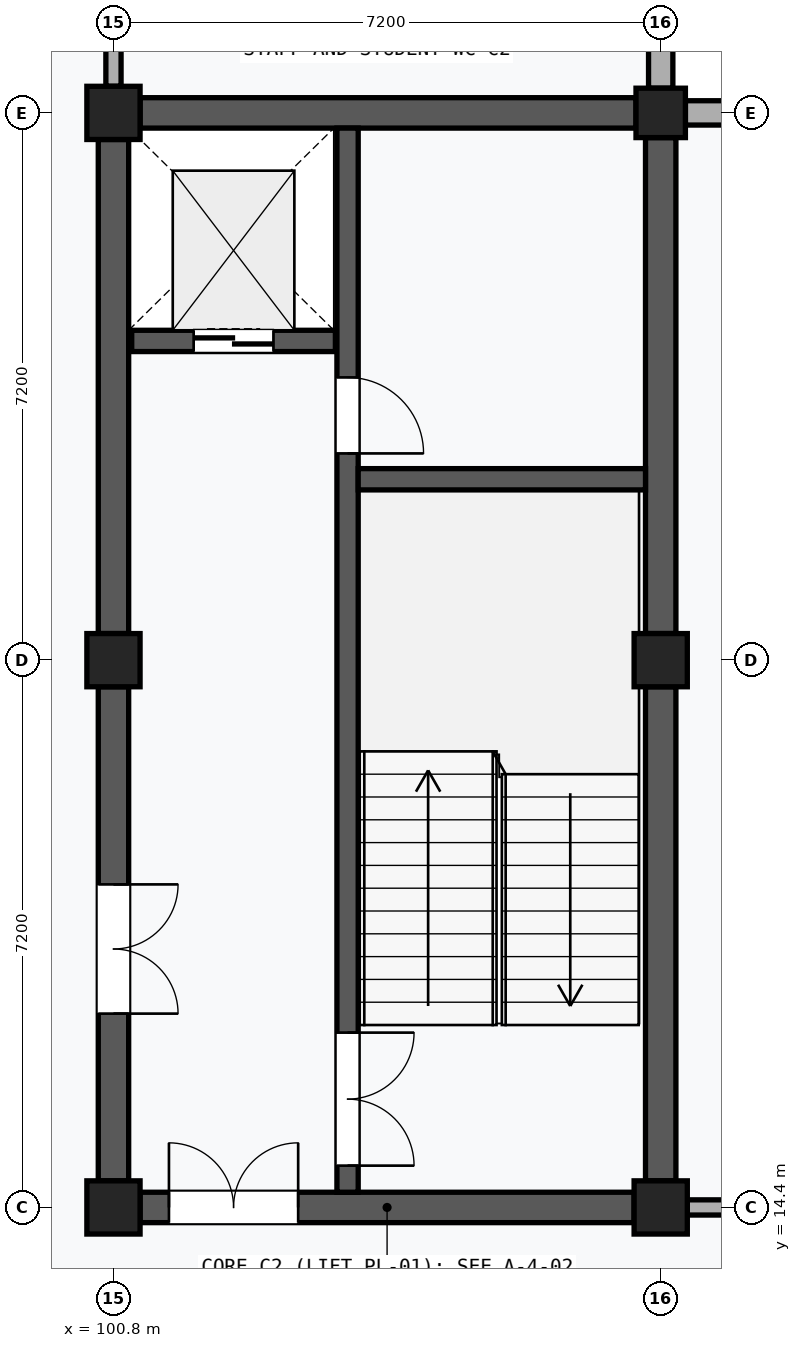
"""IFC4 building model, lengths in metres.
Left out: names, types, materials, properties, quantities, classifications, styles, units other than length and angle.
Written with IfcOpenShell. Run it as: python <this file> out.ifc"""

import sys

from ifc_helpers import new_model, si_unit, direction, frame, frame_2d, origin, origin_2d, place, context, subcontext, project, spatial, rectangle, extrude, element, fill, save


model = new_model("IFC4")
c1 = context("Model", 3, precision=1e-05, world=origin(), true_north=direction((0.0, 1.0)))
c2 = subcontext(c1, "Body", "Model", "MODEL_VIEW")
j1 = project(units=[si_unit("LENGTHUNIT", "METRE"), si_unit("PLANEANGLEUNIT", "RADIAN")], contexts=[c1])
p1 = place(None, origin())
s1 = spatial("IfcSite", under=j1, at=p1, CompositionType="ELEMENT")
p2 = place(p1, origin())
s2 = spatial("IfcBuilding", under=s1, at=p2, CompositionType="ELEMENT")
p3 = place(p2, frame((0.0, 0.0, 26.6)))
s3 = spatial("IfcBuildingStorey", under=s2, at=p3, CompositionType="ELEMENT", Elevation=26.6)
for number, where, z_axis, x_axis in (
    (1, (100.8, 14.4, 0.0), (0.0, 0.0, 1.0), (1.0, 0.0, 0.0)),
    (2, (100.8, 21.6, 0.0), (0.0, 0.0, 1.0), (1.0, 0.0, 0.0)),
    (3, (100.8, 28.8, 0.0), (0.0, 0.0, 1.0), (1.0, 0.0, 0.0)),
    (4, (108.0, 14.4, 0.0), (0.0, 0.0, 1.0), (1.0, 0.0, 0.0)),
    (5, (108.0, 21.6, 0.0), (0.0, 0.0, 1.0), (1.0, 0.0, 0.0)),
):
    element("IfcColumn", number, at=place(p3, frame(where, z_axis=z_axis, x_axis=x_axis)), inside=s3, PredefinedType="COLUMN", context=c2, shape_type="SweptSolid", body=[
        extrude(rectangle(XDim=0.7, YDim=0.7, at=origin_2d()), origin(), (0.0, 0.0, 1.0), 4.0),
    ])
p4 = place(p3, frame((108.0, 28.8, 0.0), z_axis=(0.0, 0.0, 1.0), x_axis=(1.0, 0.0, 0.0)))
e6 = element("IfcColumn", 6, at=p4, inside=s3, PredefinedType="COLUMN", context=c2, shape_type="SweptSolid", body=[
    extrude(rectangle(XDim=0.65, YDim=0.65, at=origin_2d()), origin(), (0.0, 0.0, 1.0), 4.0),
])
p5 = place(p3, frame((108.0, 29.125, 0.0), z_axis=(0.0, 0.0, 1.0), x_axis=(0.0, 1.0, 0.0)))
e7 = element("IfcWall", 7, at=p5, inside=s3, PredefinedType="SOLIDWALL", context=c2, shape_type="SweptSolid", body=[
    extrude(rectangle(XDim=6.5, YDim=0.32, at=frame_2d((3.25, 0.0))), origin(), (0.0, 0.0, 1.0), 3.1),
])
p6 = place(p5, frame((2.5, 0.0, 1.1)))
e8 = element("IfcOpeningElement", 8, at=p6, cuts=e7, PredefinedType="OPENING", context=c2, shape_type="SweptSolid", body=[
    extrude(rectangle(XDim=1.5, YDim=1.35, at=frame_2d((0.75, 0.675))), frame((0.0, 0.172, 0.0), z_axis=(0.0, -1.0, 0.0), x_axis=(1.0, 0.0, 0.0)), (0.0, 0.0, 1.0), 0.344),
])
p7 = place(p3, frame((108.325, 28.8, 0.0), z_axis=(0.0, 0.0, 1.0), x_axis=(1.0, 0.0, 0.0)))
e9 = element("IfcWall", 9, at=p7, inside=s3, PredefinedType="SOLIDWALL", context=c2, shape_type="SweptSolid", body=[
    extrude(rectangle(XDim=6.625, YDim=0.32, at=frame_2d((3.312, 0.0))), origin(), (0.0, 0.0, 1.0), 3.1),
])
p8 = place(p7, frame((2.562, 0.0, 1.1)))
e10 = element("IfcOpeningElement", 10, at=p8, cuts=e9, PredefinedType="OPENING", context=c2, shape_type="SweptSolid", body=[
    extrude(rectangle(XDim=1.5, YDim=1.35, at=frame_2d((0.75, 0.675))), frame((0.0, 0.172, 0.0), z_axis=(0.0, -1.0, 0.0), x_axis=(1.0, 0.0, 0.0)), (0.0, 0.0, 1.0), 0.344),
])
p9 = place(p3, frame((100.8, 14.75, 0.0), z_axis=(0.0, 0.0, 1.0), x_axis=(0.0, 1.0, 0.0)))
e11 = element("IfcWall", 11, at=p9, inside=s3, PredefinedType="SHEAR", context=c2, shape_type="SweptSolid", body=[
    extrude(rectangle(XDim=6.5, YDim=0.4, at=frame_2d((3.25, 0.0))), origin(), (0.0, 0.0, 1.0), 2.96),
])
p10 = place(p9, frame((2.2, 0.0, 0.0)))
e12 = element("IfcOpeningElement", 12, at=p10, cuts=e11, PredefinedType="OPENING", context=c2, shape_type="SweptSolid", body=[
    extrude(rectangle(XDim=1.7, YDim=2.25, at=frame_2d((0.85, 1.125))), frame((0.0, 0.212, 0.0), z_axis=(0.0, -1.0, 0.0), x_axis=(1.0, 0.0, 0.0)), (0.0, 0.0, 1.0), 0.424),
])
for number, where, z_axis, x_axis in (
    (13, (100.8, 21.95, 0.0), (0.0, 0.0, 1.0), (0.0, 1.0, 0.0)),
    (14, (108.0, 14.75, 0.0), (0.0, 0.0, 1.0), (0.0, 1.0, 0.0)),
):
    element("IfcWall", number, at=place(p3, frame(where, z_axis=z_axis, x_axis=x_axis)), inside=s3, PredefinedType="SHEAR", context=c2, shape_type="SweptSolid", body=[
        extrude(rectangle(XDim=6.5, YDim=0.4, at=frame_2d((3.25, 0.0))), origin(), (0.0, 0.0, 1.0), 2.96),
    ])
p11 = place(p3, frame((108.0, 21.95, 0.0), z_axis=(0.0, 0.0, 1.0), x_axis=(0.0, 1.0, 0.0)))
e15 = element("IfcWall", 15, at=p11, inside=s3, PredefinedType="SHEAR", context=c2, shape_type="SweptSolid", body=[
    extrude(rectangle(XDim=6.525, YDim=0.4, at=frame_2d((3.263, 0.0))), origin(), (0.0, 0.0, 1.0), 2.96),
])
p12 = place(p3, frame((101.15, 14.4, 0.0), z_axis=(0.0, 0.0, 1.0), x_axis=(1.0, 0.0, 0.0)))
e16 = element("IfcWall", 16, at=p12, inside=s3, PredefinedType="SHEAR", context=c2, shape_type="SweptSolid", body=[
    extrude(rectangle(XDim=6.5, YDim=0.4, at=frame_2d((3.25, 0.0))), origin(), (0.0, 0.0, 1.0), 3.03),
])
p13 = place(p12, frame((0.38, 0.0, 0.0)))
e17 = element("IfcOpeningElement", 17, at=p13, cuts=e16, PredefinedType="OPENING", context=c2, shape_type="SweptSolid", body=[
    extrude(rectangle(XDim=1.7, YDim=2.25, at=frame_2d((0.85, 1.125))), frame((0.0, 0.212, 0.0), z_axis=(0.0, -1.0, 0.0), x_axis=(1.0, 0.0, 0.0)), (0.0, 0.0, 1.0), 0.424),
])
p14 = place(p3, frame((101.15, 28.8, 0.0), z_axis=(0.0, 0.0, 1.0), x_axis=(1.0, 0.0, 0.0)))
e18 = element("IfcWall", 18, at=p14, inside=s3, PredefinedType="SHEAR", context=c2, shape_type="SweptSolid", body=[
    extrude(rectangle(XDim=6.525, YDim=0.4, at=frame_2d((3.263, 0.0))), origin(), (0.0, 0.0, 1.0), 2.96),
])
p15 = place(p3, frame((103.88, 14.6, 0.0), z_axis=(0.0, 0.0, 1.0), x_axis=(0.0, 1.0, 0.0)))
e19 = element("IfcWall", 19, at=p15, inside=s3, PredefinedType="SHEAR", context=c2, shape_type="SweptSolid", body=[
    extrude(rectangle(XDim=14.0, YDim=0.28, at=frame_2d((7.0, 0.0))), origin(), (0.0, 0.0, 1.0), 3.73),
])
p16 = place(p15, frame((0.35, 0.0, 0.0)))
e20 = element("IfcOpeningElement", 20, at=p16, cuts=e19, PredefinedType="OPENING", context=c2, shape_type="SweptSolid", body=[
    extrude(rectangle(XDim=1.75, YDim=2.15, at=frame_2d((0.875, 1.075))), frame((0.0, 0.152, 0.0), z_axis=(0.0, -1.0, 0.0), x_axis=(1.0, 0.0, 0.0)), (0.0, 0.0, 1.0), 0.304),
])
p17 = place(p15, frame((9.72, 0.0, 0.0)))
e21 = element("IfcOpeningElement", 21, at=p17, cuts=e19, PredefinedType="OPENING", context=c2, shape_type="SweptSolid", body=[
    extrude(rectangle(XDim=1.0, YDim=2.15, at=frame_2d((0.5, 1.075))), frame((0.0, 0.152, 0.0), z_axis=(0.0, -1.0, 0.0), x_axis=(1.0, 0.0, 0.0)), (0.0, 0.0, 1.0), 0.304),
])
p18 = place(p3, frame((104.02, 23.98, 0.0), z_axis=(0.0, 0.0, 1.0), x_axis=(1.0, 0.0, 0.0)))
e22 = element("IfcWall", 22, at=p18, inside=s3, PredefinedType="SHEAR", context=c2, shape_type="SweptSolid", body=[
    extrude(rectangle(XDim=3.78, YDim=0.28, at=frame_2d((1.89, 0.0))), origin(), (0.0, 0.0, 1.0), 3.73),
])
p19 = place(p3, frame((101.04, 25.8, 0.0), z_axis=(0.0, 0.0, 1.0), x_axis=(1.0, 0.0, 0.0)))
e23 = element("IfcWall", 23, at=p19, inside=s3, PredefinedType="SHEAR", context=c2, shape_type="SweptSolid", body=[
    extrude(rectangle(XDim=2.68, YDim=0.28, at=frame_2d((1.34, 0.0))), origin(), (0.0, 0.0, 1.0), 3.73),
])
p20 = place(p19, frame((0.815, 0.0, 0.0)))
e24 = element("IfcOpeningElement", 24, at=p20, cuts=e23, PredefinedType="OPENING", context=c2, shape_type="SweptSolid", body=[
    extrude(rectangle(XDim=1.05, YDim=2.2, at=frame_2d((0.525, 1.1))), frame((0.0, 0.152, 0.0), z_axis=(0.0, -1.0, 0.0), x_axis=(1.0, 0.0, 0.0)), (0.0, 0.0, 1.0), 0.304),
])
p21 = place(p3, frame((108.35, 14.4, 0.0), z_axis=(0.0, 0.0, 1.0), x_axis=(1.0, 0.0, 0.0)))
e25 = element("IfcWall", 25, at=p21, inside=s3, PredefinedType="PARTITIONING", context=c2, shape_type="SweptSolid", body=[
    extrude(rectangle(XDim=6.5, YDim=0.2, at=frame_2d((3.25, 0.0))), origin(), (0.0, 0.0, 1.0), 2.96),
])
p22 = place(p21, frame((2.73, 0.0, 0.0)))
e26 = element("IfcOpeningElement", 26, at=p22, cuts=e25, PredefinedType="OPENING", context=c2, shape_type="SweptSolid", body=[
    extrude(rectangle(XDim=1.04, YDim=2.14, at=frame_2d((0.52, 1.07))), frame((0.0, 0.112, 0.0), z_axis=(0.0, -1.0, 0.0), x_axis=(1.0, 0.0, 0.0)), (0.0, 0.0, 1.0), 0.224),
])
p23 = place(p3, frame((100.8, 29.15, 0.0), z_axis=(0.0, 0.0, 1.0), x_axis=(0.0, 1.0, 0.0)))
e27 = element("IfcWall", 27, at=p23, inside=s3, PredefinedType="PARTITIONING", context=c2, shape_type="SweptSolid", body=[
    extrude(rectangle(XDim=6.5, YDim=0.2, at=frame_2d((3.25, 0.0))), origin(), (0.0, 0.0, 1.0), 2.96),
])
p24 = place(p23, frame((2.67, 0.0, 0.0)))
e28 = element("IfcOpeningElement", 28, at=p24, cuts=e27, PredefinedType="OPENING", context=c2, shape_type="SweptSolid", body=[
    extrude(rectangle(XDim=1.16, YDim=2.22, at=frame_2d((0.58, 1.11))), frame((0.0, 0.112, 0.0), z_axis=(0.0, -1.0, 0.0), x_axis=(1.0, 0.0, 0.0)), (0.0, 0.0, 1.0), 0.224),
])
p25 = place(p10, frame((1.7, 0.0, 0.0), z_axis=(0.0, 0.0, 1.0), x_axis=(-1.0, 0.0, 0.0)))
e29 = element("IfcDoor", 29, at=p25, inside=s3, OperationType="DOUBLE_DOOR_SINGLE_SWING", PredefinedType="DOOR", context=c2, shape_type="SweptSolid", body=[
    extrude(rectangle(XDim=1.7, YDim=2.25, at=frame_2d((0.85, 1.125))), frame((0.0, 0.025, 0.0), z_axis=(0.0, -1.0, 0.0), x_axis=(1.0, 0.0, 0.0)), (0.0, 0.0, 1.0), 0.05),
])
fill(e12, e29)
p26 = place(p13, origin())
e30 = element("IfcDoor", 30, at=p26, inside=s3, OperationType="DOUBLE_DOOR_SINGLE_SWING", PredefinedType="DOOR", context=c2, shape_type="SweptSolid", body=[
    extrude(rectangle(XDim=1.7, YDim=2.25, at=frame_2d((0.85, 1.125))), frame((0.0, 0.025, 0.0), z_axis=(0.0, -1.0, 0.0), x_axis=(1.0, 0.0, 0.0)), (0.0, 0.0, 1.0), 0.05),
])
fill(e17, e30)
p27 = place(p16, frame((1.75, 0.0, 0.0), z_axis=(0.0, 0.0, 1.0), x_axis=(-1.0, 0.0, 0.0)))
e31 = element("IfcDoor", 31, at=p27, inside=s3, OperationType="DOUBLE_DOOR_SINGLE_SWING", PredefinedType="DOOR", context=c2, shape_type="SweptSolid", body=[
    extrude(rectangle(XDim=1.75, YDim=2.15, at=frame_2d((0.875, 1.075))), frame((0.0, 0.025, 0.0), z_axis=(0.0, -1.0, 0.0), x_axis=(1.0, 0.0, 0.0)), (0.0, 0.0, 1.0), 0.05),
])
fill(e20, e31)
p28 = place(p17, frame((1.0, 0.0, 0.0), z_axis=(0.0, 0.0, 1.0), x_axis=(-1.0, 0.0, 0.0)))
e32 = element("IfcDoor", 32, at=p28, inside=s3, OperationType="SINGLE_SWING_RIGHT", PredefinedType="DOOR", context=c2, shape_type="SweptSolid", body=[
    extrude(rectangle(XDim=1.0, YDim=2.15, at=frame_2d((0.5, 1.075))), frame((0.0, 0.025, 0.0), z_axis=(0.0, -1.0, 0.0), x_axis=(1.0, 0.0, 0.0)), (0.0, 0.0, 1.0), 0.05),
])
fill(e21, e32)
p29 = place(p20, frame((1.05, 0.0, 0.0), z_axis=(0.0, 0.0, 1.0), x_axis=(-1.0, 0.0, 0.0)))
e33 = element("IfcDoor", 33, at=p29, inside=s3, OperationType="DOUBLE_DOOR_SLIDING", PredefinedType="DOOR", context=c2, shape_type="SweptSolid", body=[
    extrude(rectangle(XDim=1.05, YDim=2.2, at=frame_2d((0.525, 1.1))), frame((0.0, 0.025, 0.0), z_axis=(0.0, -1.0, 0.0), x_axis=(1.0, 0.0, 0.0)), (0.0, 0.0, 1.0), 0.05),
])
fill(e24, e33)
save(model, sys.argv[1])
